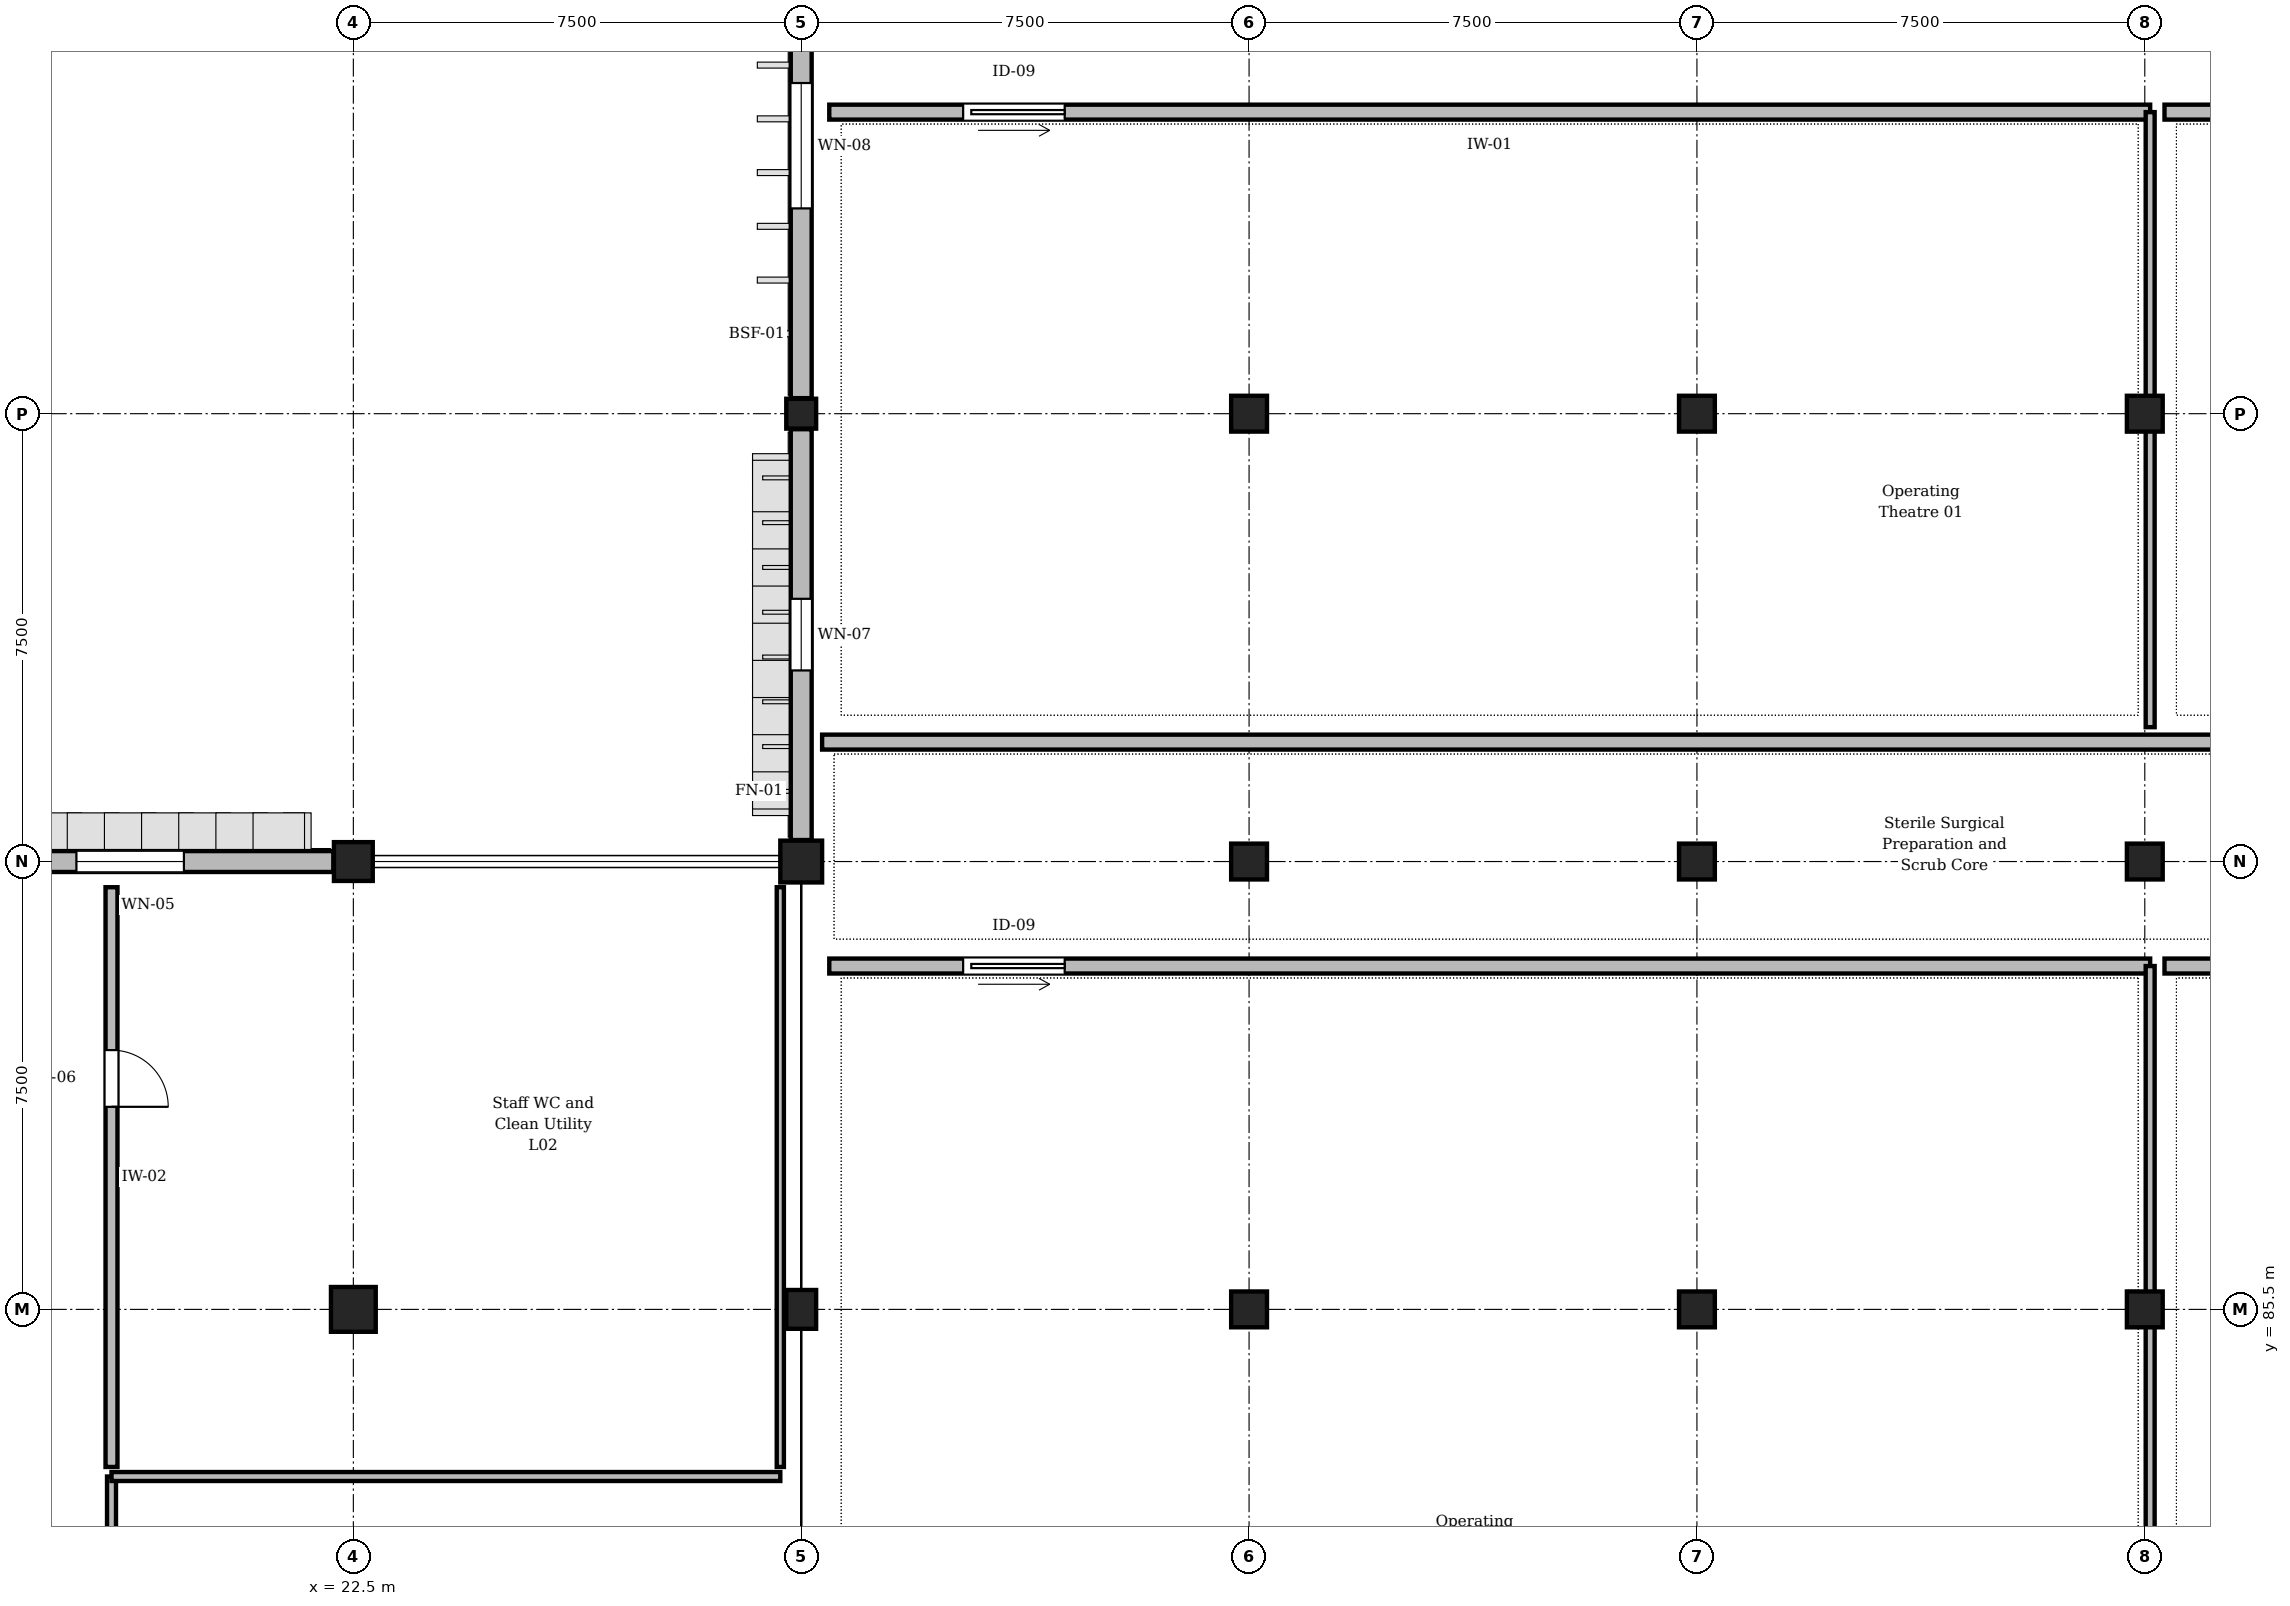
"""IFC4 building model, lengths in metres.
Left out: names, types, materials, properties, quantities, classifications, styles, units other than length and angle.
Written with IfcOpenShell. Run it as: python <this file> out.ifc"""

import sys

from ifc_helpers import new_model, si_unit, direction, frame, frame_2d, origin, origin_2d, place, context, subcontext, project, spatial, rectangle, circle, extrude, element, fill, save


model = new_model("IFC4")
c1 = context("Model", 3, precision=1e-05, world=origin(), true_north=direction((0.0, 1.0)))
c2 = subcontext(c1, "Body", "Model", "MODEL_VIEW")
j1 = project(units=[si_unit("LENGTHUNIT", "METRE"), si_unit("PLANEANGLEUNIT", "RADIAN")], contexts=[c1])
p1 = place(None, origin())
s1 = spatial("IfcSite", under=j1, at=p1, CompositionType="ELEMENT")
p2 = place(p1, origin())
s2 = spatial("IfcBuilding", under=s1, at=p2, CompositionType="ELEMENT")
p3 = place(p2, frame((0.0, 0.0, 9.3)))
s3 = spatial("IfcBuildingStorey", under=s2, at=p3, CompositionType="ELEMENT", Elevation=9.3)
p4 = place(p3, frame((22.5, 85.5, 0.0), z_axis=(0.0, 0.0, 1.0), x_axis=(1.0, 0.0, 0.0)))
e1 = element("IfcColumn", 1, at=p4, inside=s3, PredefinedType="COLUMN", context=c2, shape_type="SweptSolid", body=[
    extrude(rectangle(XDim=0.75, YDim=0.75, at=origin_2d()), origin(), (0.0, 0.0, 1.0), 4.8),
])
p5 = place(p3, frame((22.5, 93.0, 0.0), z_axis=(0.0, 0.0, 1.0), x_axis=(1.0, 0.0, 0.0)))
e2 = element("IfcColumn", 2, at=p5, inside=s3, PredefinedType="COLUMN", context=c2, shape_type="SweptSolid", body=[
    extrude(rectangle(XDim=0.65, YDim=0.65, at=origin_2d()), origin(), (0.0, 0.0, 1.0), 4.8),
])
p6 = place(p3, frame((30.0, 85.5, 0.0), z_axis=(0.0, 0.0, 1.0), x_axis=(1.0, 0.0, 0.0)))
e3 = element("IfcColumn", 3, at=p6, inside=s3, PredefinedType="COLUMN", context=c2, shape_type="SweptSolid", body=[
    extrude(rectangle(XDim=0.5, YDim=0.65, at=origin_2d()), origin(), (0.0, 0.0, 1.0), 4.8),
])
p7 = place(p3, frame((30.0, 93.0, 0.0), z_axis=(0.0, 0.0, 1.0), x_axis=(1.0, 0.0, 0.0)))
e4 = element("IfcColumn", 4, at=p7, inside=s3, PredefinedType="COLUMN", context=c2, shape_type="SweptSolid", body=[
    extrude(rectangle(XDim=0.7, YDim=0.7, at=origin_2d()), origin(), (0.0, 0.0, 1.0), 4.8),
])
p8 = place(p3, frame((30.0, 100.5, 0.0), z_axis=(0.0, 0.0, 1.0), x_axis=(1.0, 0.0, 0.0)))
e5 = element("IfcColumn", 5, at=p8, inside=s3, PredefinedType="COLUMN", context=c2, shape_type="SweptSolid", body=[
    extrude(rectangle(XDim=0.5, YDim=0.5, at=origin_2d()), origin(), (0.0, 0.0, 1.0), 4.8),
])
for number, where, z_axis, x_axis in (
    (6, (37.5, 85.5, 0.0), (0.0, 0.0, 1.0), (1.0, 0.0, 0.0)),
    (7, (37.5, 93.0, 0.0), (0.0, 0.0, 1.0), (1.0, 0.0, 0.0)),
):
    element("IfcColumn", number, at=place(p3, frame(where, z_axis=z_axis, x_axis=x_axis)), inside=s3, PredefinedType="COLUMN", context=c2, shape_type="SweptSolid", body=[
        extrude(rectangle(XDim=0.6, YDim=0.6, at=origin_2d()), origin(), (0.0, 0.0, 1.0), 4.8),
    ])
p9 = place(p3, frame((37.5, 100.5, 0.0), z_axis=(0.0, 0.0, 1.0), x_axis=(1.0, 0.0, 0.0)))
e8 = element("IfcColumn", 8, at=p9, inside=s3, PredefinedType="COLUMN", context=c2, shape_type="SweptSolid", body=[
    extrude(circle(Radius=0.3, at=origin_2d()), origin(), (0.0, 0.0, 1.0), 4.8),
])
p10 = place(p3, frame((45.0, 85.5, 0.0), z_axis=(0.0, 0.0, 1.0), x_axis=(1.0, 0.0, 0.0)))
e9 = element("IfcColumn", 9, at=p10, inside=s3, PredefinedType="COLUMN", context=c2, shape_type="SweptSolid", body=[
    extrude(rectangle(XDim=0.6, YDim=0.6, at=origin_2d()), origin(), (0.0, 0.0, 1.0), 4.8),
])
p11 = place(p3, frame((45.0, 93.0, 0.0), z_axis=(0.0, 0.0, 1.0), x_axis=(1.0, 0.0, 0.0)))
e10 = element("IfcColumn", 10, at=p11, inside=s3, PredefinedType="COLUMN", context=c2, shape_type="SweptSolid", body=[
    extrude(circle(Radius=0.3, at=origin_2d()), origin(), (0.0, 0.0, 1.0), 4.8),
])
p12 = place(p3, frame((45.0, 100.5, 0.0), z_axis=(0.0, 0.0, 1.0), x_axis=(1.0, 0.0, 0.0)))
e11 = element("IfcColumn", 11, at=p12, inside=s3, PredefinedType="COLUMN", context=c2, shape_type="SweptSolid", body=[
    extrude(rectangle(XDim=0.6, YDim=0.6, at=origin_2d()), origin(), (0.0, 0.0, 1.0), 4.8),
])
p13 = place(p3, frame((52.5, 85.5, 0.0), z_axis=(0.0, 0.0, 1.0), x_axis=(1.0, 0.0, 0.0)))
e12 = element("IfcColumn", 12, at=p13, inside=s3, PredefinedType="COLUMN", context=c2, shape_type="SweptSolid", body=[
    extrude(circle(Radius=0.3, at=origin_2d()), origin(), (0.0, 0.0, 1.0), 4.8),
])
for number, where, z_axis, x_axis in (
    (13, (52.5, 93.0, 0.0), (0.0, 0.0, 1.0), (1.0, 0.0, 0.0)),
    (14, (52.5, 100.5, 0.0), (0.0, 0.0, 1.0), (1.0, 0.0, 0.0)),
):
    element("IfcColumn", number, at=place(p3, frame(where, z_axis=z_axis, x_axis=x_axis)), inside=s3, PredefinedType="COLUMN", context=c2, shape_type="SweptSolid", body=[
        extrude(rectangle(XDim=0.6, YDim=0.6, at=origin_2d()), origin(), (0.0, 0.0, 1.0), 4.8),
    ])
p14 = place(p3, frame((15.36, 93.0, 0.0), z_axis=(0.0, 0.0, 1.0), x_axis=(1.0, 0.0, 0.0)))
e15 = element("IfcWall", 15, at=p14, inside=s3, PredefinedType="STANDARD", context=c2, shape_type="SweptSolid", body=[
    extrude(rectangle(XDim=6.805, YDim=0.35, at=frame_2d((3.402, 0.0))), origin(), (0.0, 0.0, 1.0), 3.95),
])
p15 = place(p14, frame((2.502, 0.0, 0.9)))
e16 = element("IfcOpeningElement", 16, at=p15, cuts=e15, PredefinedType="OPENING", context=c2, shape_type="SweptSolid", body=[
    extrude(rectangle(XDim=1.8, YDim=2.1, at=frame_2d((0.9, 1.05))), frame((0.0, 0.185, 0.0), z_axis=(0.0, -1.0, 0.0), x_axis=(1.0, 0.0, 0.0)), (0.0, 0.0, 1.0), 0.37),
])
p16 = place(p3, frame((30.0, 93.36, 0.0), z_axis=(0.0, 0.0, 1.0), x_axis=(0.0, 1.0, 0.0)))
e17 = element("IfcWall", 17, at=p16, inside=s3, PredefinedType="STANDARD", context=c2, shape_type="SweptSolid", body=[
    extrude(rectangle(XDim=6.88, YDim=0.35, at=frame_2d((3.44, 0.0))), origin(), (0.0, 0.0, 1.0), 3.95),
])
p17 = place(p16, frame((2.84, 0.0, 0.9)))
e18 = element("IfcOpeningElement", 18, at=p17, cuts=e17, PredefinedType="OPENING", context=c2, shape_type="SweptSolid", body=[
    extrude(rectangle(XDim=1.2, YDim=2.1, at=frame_2d((0.6, 1.05))), frame((0.0, 0.185, 0.0), z_axis=(0.0, -1.0, 0.0), x_axis=(1.0, 0.0, 0.0)), (0.0, 0.0, 1.0), 0.37),
])
p18 = place(p3, frame((30.0, 100.76, 0.0), z_axis=(0.0, 0.0, 1.0), x_axis=(0.0, 1.0, 0.0)))
e19 = element("IfcWall", 19, at=p18, inside=s3, PredefinedType="STANDARD", context=c2, shape_type="SweptSolid", body=[
    extrude(rectangle(XDim=8.455, YDim=0.35, at=frame_2d((4.228, 0.0))), origin(), (0.0, 0.0, 1.0), 4.0),
])
p19 = place(p18, frame((3.177, 0.0, 0.9)))
e20 = element("IfcOpeningElement", 20, at=p19, cuts=e19, PredefinedType="OPENING", context=c2, shape_type="SweptSolid", body=[
    extrude(rectangle(XDim=2.1, YDim=2.1, at=frame_2d((1.05, 1.05))), frame((0.0, 0.185, 0.0), z_axis=(0.0, -1.0, 0.0), x_axis=(1.0, 0.0, 0.0)), (0.0, 0.0, 1.0), 0.37),
])
p20 = place(p3, frame((18.45, 82.701, 0.0), z_axis=(0.0, 0.0, 1.0), x_axis=(0.0, -1.0, 0.0)))
e21 = element("IfcWall", 21, at=p20, inside=s3, PredefinedType="PARTITIONING", context=c2, shape_type="SweptSolid", body=[
    extrude(rectangle(XDim=9.709, YDim=0.15, at=frame_2d((4.854, 0.0))), origin(), (0.0, 0.0, 1.0), 4.135),
])
p21 = place(p20, frame((1.036, 0.0, 0.0)))
e22 = element("IfcOpeningElement", 22, at=p21, cuts=e21, PredefinedType="OPENING", context=c2, shape_type="SweptSolid", body=[
    extrude(rectangle(XDim=1.35, YDim=2.25, at=frame_2d((0.675, 1.125))), frame((0.0, 0.085, 0.0), z_axis=(0.0, -1.0, 0.0), x_axis=(1.0, 0.0, 0.0)), (0.0, 0.0, 1.0), 0.17),
])
p22 = place(p3, frame((18.45, 92.57, 0.0), z_axis=(0.0, 0.0, 1.0), x_axis=(0.0, -1.0, 0.0)))
e23 = element("IfcWall", 23, at=p22, inside=s3, PredefinedType="STANDARD", context=c2, shape_type="SweptSolid", body=[
    extrude(rectangle(XDim=9.709, YDim=0.2, at=frame_2d((4.854, 0.0))), origin(), (0.0, 0.0, 1.0), 4.135),
])
p23 = place(p22, frame((2.728, 0.0, 0.0)))
e24 = element("IfcOpeningElement", 24, at=p23, cuts=e23, PredefinedType="OPENING", context=c2, shape_type="SweptSolid", body=[
    extrude(rectangle(XDim=0.95, YDim=2.15, at=frame_2d((0.475, 1.075))), frame((0.0, 0.11, 0.0), z_axis=(0.0, -1.0, 0.0), x_axis=(1.0, 0.0, 0.0)), (0.0, 0.0, 1.0), 0.22),
])
p24 = place(p3, frame((142.15, 95.0, 0.0), z_axis=(0.0, 0.0, 1.0), x_axis=(-1.0, 0.0, 0.0)))
e25 = element("IfcWall", 25, at=p24, inside=s3, PredefinedType="STANDARD", context=c2, shape_type="SweptSolid", body=[
    extrude(rectangle(XDim=111.8, YDim=0.25, at=frame_2d((55.9, 0.0))), origin(), (0.0, 0.0, 1.0), 4.535),
])
p25 = place(p24, frame((55.15, 0.0, 0.0)))
e26 = element("IfcOpeningElement", 26, at=p25, cuts=e25, PredefinedType="OPENING", context=c2, shape_type="SweptSolid", body=[
    extrude(rectangle(XDim=1.5, YDim=2.3, at=frame_2d((0.75, 1.15))), frame((0.0, 0.135, 0.0), z_axis=(0.0, -1.0, 0.0), x_axis=(1.0, 0.0, 0.0)), (0.0, 0.0, 1.0), 0.27),
])
p26 = place(p3, frame((52.59, 105.55, 0.0), z_axis=(0.0, 0.0, 1.0), x_axis=(-1.0, 0.0, 0.0)))
e27 = element("IfcWall", 27, at=p26, inside=s3, PredefinedType="STANDARD", context=c2, shape_type="SweptSolid", body=[
    extrude(rectangle(XDim=22.12, YDim=0.25, at=frame_2d((11.06, 0.0))), origin(), (0.0, 0.0, 1.0), 4.535),
])
p27 = place(p26, frame((18.178, 0.0, 0.0)))
e28 = element("IfcOpeningElement", 28, at=p27, cuts=e27, PredefinedType="OPENING", context=c2, shape_type="SweptSolid", body=[
    extrude(rectangle(XDim=1.7, YDim=2.4, at=frame_2d((0.85, 1.2))), frame((0.0, 0.135, 0.0), z_axis=(0.0, -1.0, 0.0), x_axis=(1.0, 0.0, 0.0)), (0.0, 0.0, 1.0), 0.27),
])
p28 = place(p3, frame((52.59, 91.25, 0.0), z_axis=(0.0, 0.0, 1.0), x_axis=(-1.0, 0.0, 0.0)))
e29 = element("IfcWall", 29, at=p28, inside=s3, PredefinedType="STANDARD", context=c2, shape_type="SweptSolid", body=[
    extrude(rectangle(XDim=22.12, YDim=0.25, at=frame_2d((11.06, 0.0))), origin(), (0.0, 0.0, 1.0), 4.535),
])
p29 = place(p28, frame((18.178, 0.0, 0.0)))
e30 = element("IfcOpeningElement", 30, at=p29, cuts=e29, PredefinedType="OPENING", context=c2, shape_type="SweptSolid", body=[
    extrude(rectangle(XDim=1.7, YDim=2.4, at=frame_2d((0.85, 1.2))), frame((0.0, 0.135, 0.0), z_axis=(0.0, -1.0, 0.0), x_axis=(1.0, 0.0, 0.0)), (0.0, 0.0, 1.0), 0.27),
])
p30 = place(p3, frame((74.95, 105.55, 0.0), z_axis=(0.0, 0.0, 1.0), x_axis=(-1.0, 0.0, 0.0)))
e31 = element("IfcWall", 31, at=p30, inside=s3, PredefinedType="STANDARD", context=c2, shape_type="SweptSolid", body=[
    extrude(rectangle(XDim=22.12, YDim=0.25, at=frame_2d((11.06, 0.0))), origin(), (0.0, 0.0, 1.0), 4.535),
])
p31 = place(p30, frame((10.21, 0.0, 0.0)))
e32 = element("IfcOpeningElement", 32, at=p31, cuts=e31, PredefinedType="OPENING", context=c2, shape_type="SweptSolid", body=[
    extrude(rectangle(XDim=1.7, YDim=2.4, at=frame_2d((0.85, 1.2))), frame((0.0, 0.135, 0.0), z_axis=(0.0, -1.0, 0.0), x_axis=(1.0, 0.0, 0.0)), (0.0, 0.0, 1.0), 0.27),
])
p32 = place(p3, frame((74.95, 91.25, 0.0), z_axis=(0.0, 0.0, 1.0), x_axis=(-1.0, 0.0, 0.0)))
e33 = element("IfcWall", 33, at=p32, inside=s3, PredefinedType="STANDARD", context=c2, shape_type="SweptSolid", body=[
    extrude(rectangle(XDim=22.12, YDim=0.25, at=frame_2d((11.06, 0.0))), origin(), (0.0, 0.0, 1.0), 4.535),
])
p33 = place(p32, frame((10.21, 0.0, 0.0)))
e34 = element("IfcOpeningElement", 34, at=p33, cuts=e33, PredefinedType="OPENING", context=c2, shape_type="SweptSolid", body=[
    extrude(rectangle(XDim=1.7, YDim=2.4, at=frame_2d((0.85, 1.2))), frame((0.0, 0.135, 0.0), z_axis=(0.0, -1.0, 0.0), x_axis=(1.0, 0.0, 0.0)), (0.0, 0.0, 1.0), 0.27),
])
p34 = place(p3, frame((18.45, 82.701, 0.0), z_axis=(0.0, 0.0, 1.0), x_axis=(1.0, 0.0, 0.0)))
e35 = element("IfcWall", 35, at=p34, inside=s3, PredefinedType="PARTITIONING", context=c2, shape_type="SweptSolid", body=[
    extrude(rectangle(XDim=11.2, YDim=0.15, at=frame_2d((5.6, 0.0))), origin(), (0.0, 0.0, 1.0), 4.535),
])
p35 = place(p3, frame((52.59, 95.25, 0.0), z_axis=(0.0, 0.0, 1.0), x_axis=(0.0, 1.0, 0.0)))
e36 = element("IfcWall", 36, at=p35, inside=s3, PredefinedType="PARTITIONING", context=c2, shape_type="SweptSolid", body=[
    extrude(rectangle(XDim=10.3, YDim=0.15, at=frame_2d((5.15, 0.0))), origin(), (0.0, 0.0, 1.0), 3.835),
])
p36 = place(p3, frame((52.59, 76.85, 0.0), z_axis=(0.0, 0.0, 1.0), x_axis=(0.0, 1.0, 0.0)))
e37 = element("IfcWall", 37, at=p36, inside=s3, PredefinedType="PARTITIONING", context=c2, shape_type="SweptSolid", body=[
    extrude(rectangle(XDim=14.4, YDim=0.15, at=frame_2d((7.2, 0.0))), origin(), (0.0, 0.0, 1.0), 3.835),
])
p37 = place(p3, frame((29.65, 82.861, 0.0), z_axis=(0.0, 0.0, 1.0), x_axis=(0.0, 1.0, 0.0)))
e38 = element("IfcWall", 38, at=p37, inside=s3, PredefinedType="PARTITIONING", context=c2, shape_type="SweptSolid", body=[
    extrude(rectangle(XDim=9.709, YDim=0.12, at=frame_2d((4.854, 0.0))), origin(), (0.0, 0.0, 1.0), 3.835),
])
p38 = place(p15, origin())
e39 = element("IfcWindow", 39, at=p38, inside=s3, PartitioningType="SINGLE_PANEL", PredefinedType="WINDOW", context=c2, shape_type="SweptSolid", body=[
    extrude(rectangle(XDim=1.8, YDim=2.1, at=frame_2d((0.9, 1.05))), frame((0.0, 0.03, 0.0), z_axis=(0.0, -1.0, 0.0), x_axis=(1.0, 0.0, 0.0)), (0.0, 0.0, 1.0), 0.06),
])
fill(e16, e39)
p39 = place(p17, origin())
e40 = element("IfcWindow", 40, at=p39, inside=s3, PartitioningType="SINGLE_PANEL", PredefinedType="WINDOW", context=c2, shape_type="SweptSolid", body=[
    extrude(rectangle(XDim=1.2, YDim=2.1, at=frame_2d((0.6, 1.05))), frame((0.0, 0.03, 0.0), z_axis=(0.0, -1.0, 0.0), x_axis=(1.0, 0.0, 0.0)), (0.0, 0.0, 1.0), 0.06),
])
fill(e18, e40)
p40 = place(p19, origin())
e41 = element("IfcWindow", 41, at=p40, inside=s3, PartitioningType="SINGLE_PANEL", PredefinedType="WINDOW", context=c2, shape_type="SweptSolid", body=[
    extrude(rectangle(XDim=2.1, YDim=2.1, at=frame_2d((1.05, 1.05))), frame((0.0, 0.03, 0.0), z_axis=(0.0, -1.0, 0.0), x_axis=(1.0, 0.0, 0.0)), (0.0, 0.0, 1.0), 0.06),
])
fill(e20, e41)
p41 = place(p23, origin())
e42 = element("IfcDoor", 42, at=p41, inside=s3, OperationType="SINGLE_SWING_RIGHT", PredefinedType="DOOR", context=c2, shape_type="SweptSolid", body=[
    extrude(rectangle(XDim=0.95, YDim=2.15, at=frame_2d((0.475, 1.075))), frame((0.0, 0.025, 0.0), z_axis=(0.0, -1.0, 0.0), x_axis=(1.0, 0.0, 0.0)), (0.0, 0.0, 1.0), 0.05),
])
fill(e24, e42)
p42 = place(p27, origin())
e43 = element("IfcDoor", 43, at=p42, inside=s3, OperationType="DOUBLE_DOOR_SLIDING", PredefinedType="DOOR", context=c2, shape_type="SweptSolid", body=[
    extrude(rectangle(XDim=1.7, YDim=2.4, at=frame_2d((0.85, 1.2))), frame((0.0, 0.025, 0.0), z_axis=(0.0, -1.0, 0.0), x_axis=(1.0, 0.0, 0.0)), (0.0, 0.0, 1.0), 0.05),
])
fill(e28, e43)
p43 = place(p29, origin())
e44 = element("IfcDoor", 44, at=p43, inside=s3, OperationType="DOUBLE_DOOR_SLIDING", PredefinedType="DOOR", context=c2, shape_type="SweptSolid", body=[
    extrude(rectangle(XDim=1.7, YDim=2.4, at=frame_2d((0.85, 1.2))), frame((0.0, 0.025, 0.0), z_axis=(0.0, -1.0, 0.0), x_axis=(1.0, 0.0, 0.0)), (0.0, 0.0, 1.0), 0.05),
])
fill(e30, e44)
save(model, sys.argv[1])
